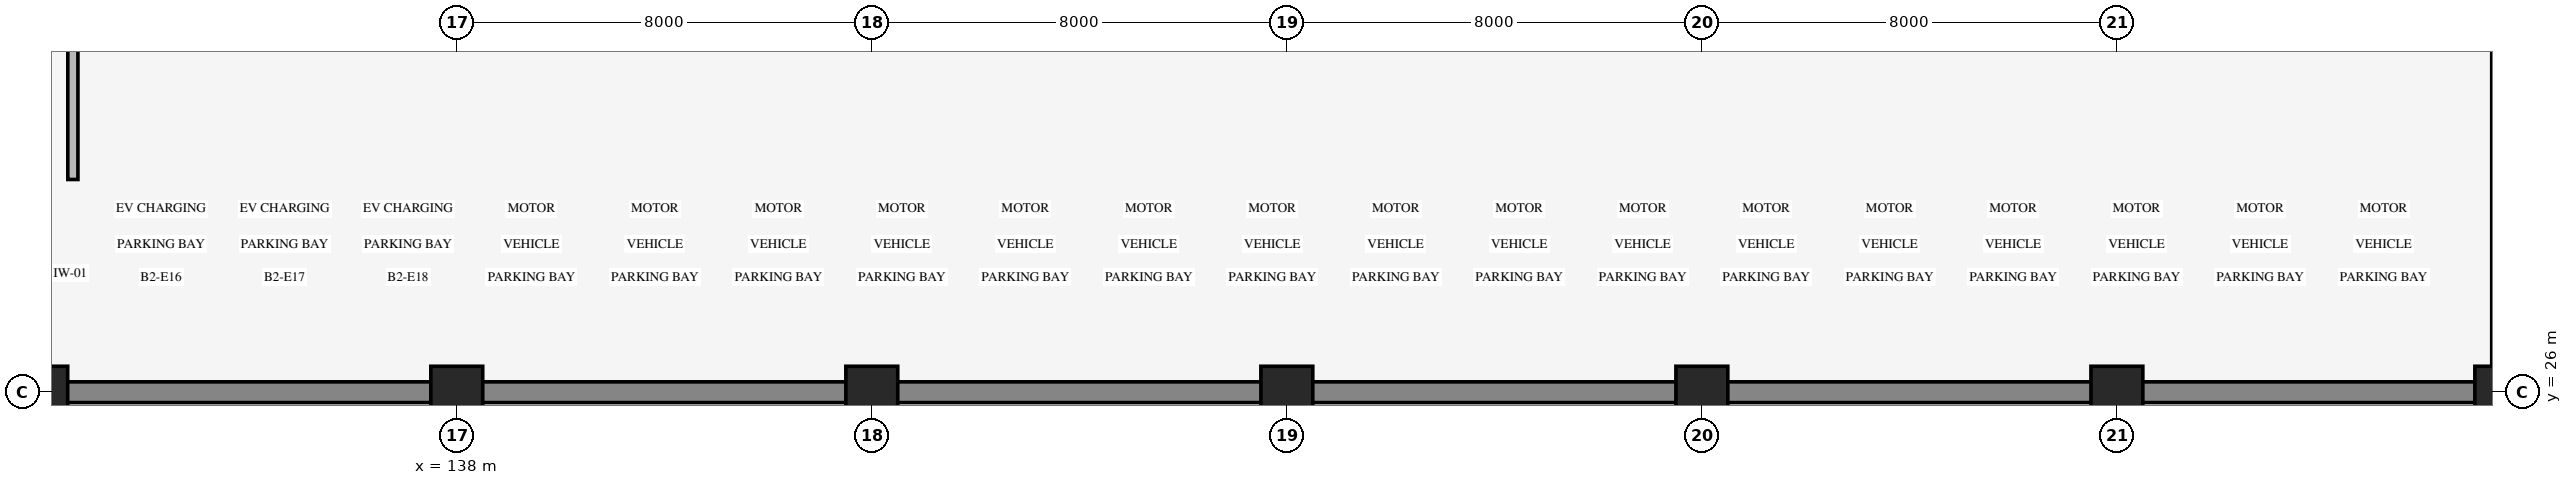
"""IFC4 building model, lengths in metres.
Left out: names, types, materials, properties, quantities, classifications, styles, units other than length and angle.
Written with IfcOpenShell. Run it as: python <this file> out.ifc"""

import sys

from ifc_helpers import new_model, si_unit, direction, frame, frame_2d, origin, origin_2d, place, context, subcontext, project, spatial, rectangle, extrude, element, save


model = new_model("IFC4")
c1 = context("Model", 3, precision=1e-05, world=origin(), true_north=direction((0.0, 1.0)))
c2 = subcontext(c1, "Body", "Model", "MODEL_VIEW")
j1 = project(units=[si_unit("LENGTHUNIT", "METRE"), si_unit("PLANEANGLEUNIT", "RADIAN")], contexts=[c1])
p1 = place(None, origin())
s1 = spatial("IfcSite", under=j1, at=p1, CompositionType="ELEMENT")
p2 = place(p1, origin())
s2 = spatial("IfcBuilding", under=s1, at=p2, CompositionType="ELEMENT")
p3 = place(p2, frame((0.0, 0.0, -9.0)))
s3 = spatial("IfcBuildingStorey", under=s2, at=p3, CompositionType="ELEMENT", Elevation=-9.0)
p4 = place(p3, frame((122.0, 26.0, 0.0), z_axis=(0.0, 0.0, 1.0), x_axis=(1.0, 0.0, 0.0)))
e1 = element("IfcWall", 1, at=p4, inside=s3, PredefinedType="SOLIDWALL", context=c2, shape_type="SweptSolid", body=[
    extrude(rectangle(XDim=55.4, YDim=0.4, at=frame_2d((27.7, 0.0))), origin(), (0.0, 0.0, 1.0), 4.22),
])
p5 = place(p3, frame((177.4, 26.0, 0.0), z_axis=(0.0, 0.0, 1.0), x_axis=(0.0, 1.0, 0.0)))
e2 = element("IfcWall", 2, at=p5, inside=s3, PredefinedType="SOLIDWALL", context=c2, shape_type="SweptSolid", body=[
    extrude(rectangle(XDim=80.0, YDim=0.35, at=frame_2d((40.0, 0.0))), origin(), (0.0, 0.0, 1.0), 4.22),
])
for number, where, z_axis, x_axis in (
    (3, (130.0, 26.0, 0.0), (0.0, 0.0, 1.0), (1.0, 0.0, 0.0)),
    (4, (138.0, 26.0, 0.0), (0.0, 0.0, 1.0), (1.0, 0.0, 0.0)),
    (5, (146.0, 26.0, 0.0), (0.0, 0.0, 1.0), (1.0, 0.0, 0.0)),
    (6, (154.0, 26.0, 0.0), (0.0, 0.0, 1.0), (1.0, 0.0, 0.0)),
    (7, (162.0, 26.0, 0.0), (0.0, 0.0, 1.0), (1.0, 0.0, 0.0)),
    (8, (170.0, 26.0, 0.0), (0.0, 0.0, 1.0), (1.0, 0.0, 0.0)),
    (9, (177.4, 26.0, 0.0), (0.0, 0.0, 1.0), (1.0, 0.0, 0.0)),
):
    element("IfcColumn", number, at=place(p3, frame(where, z_axis=z_axis, x_axis=x_axis)), inside=s3, PredefinedType="COLUMN", context=c2, shape_type="SweptSolid", body=[
        extrude(rectangle(XDim=1.0, YDim=1.0, at=origin_2d()), origin(), (0.0, 0.0, 1.0), 4.5),
    ])
p6 = place(p3, frame((130.6, 30.1, 0.0), z_axis=(0.0, 0.0, 1.0), x_axis=(0.0, 1.0, 0.0)))
e10 = element("IfcWall", 10, at=p6, inside=s3, PredefinedType="STANDARD", context=c2, shape_type="SweptSolid", body=[
    extrude(rectangle(XDim=15.9, YDim=0.195, at=frame_2d((7.95, 0.0))), origin(), (0.0, 0.0, 1.0), 3.45),
])
p7 = place(p6, frame((6.0, 0.0, 0.0)))
e11 = element("IfcOpeningElement", 11, at=p7, cuts=e10, PredefinedType="OPENING", context=c2, shape_type="SweptSolid", body=[
    extrude(rectangle(XDim=1.6, YDim=2.25, at=frame_2d((0.8, 1.125))), frame((0.0, 0.107, 0.0), z_axis=(0.0, -1.0, 0.0), x_axis=(1.0, 0.0, 0.0)), (0.0, 0.0, 1.0), 0.215),
])
save(model, sys.argv[1])
